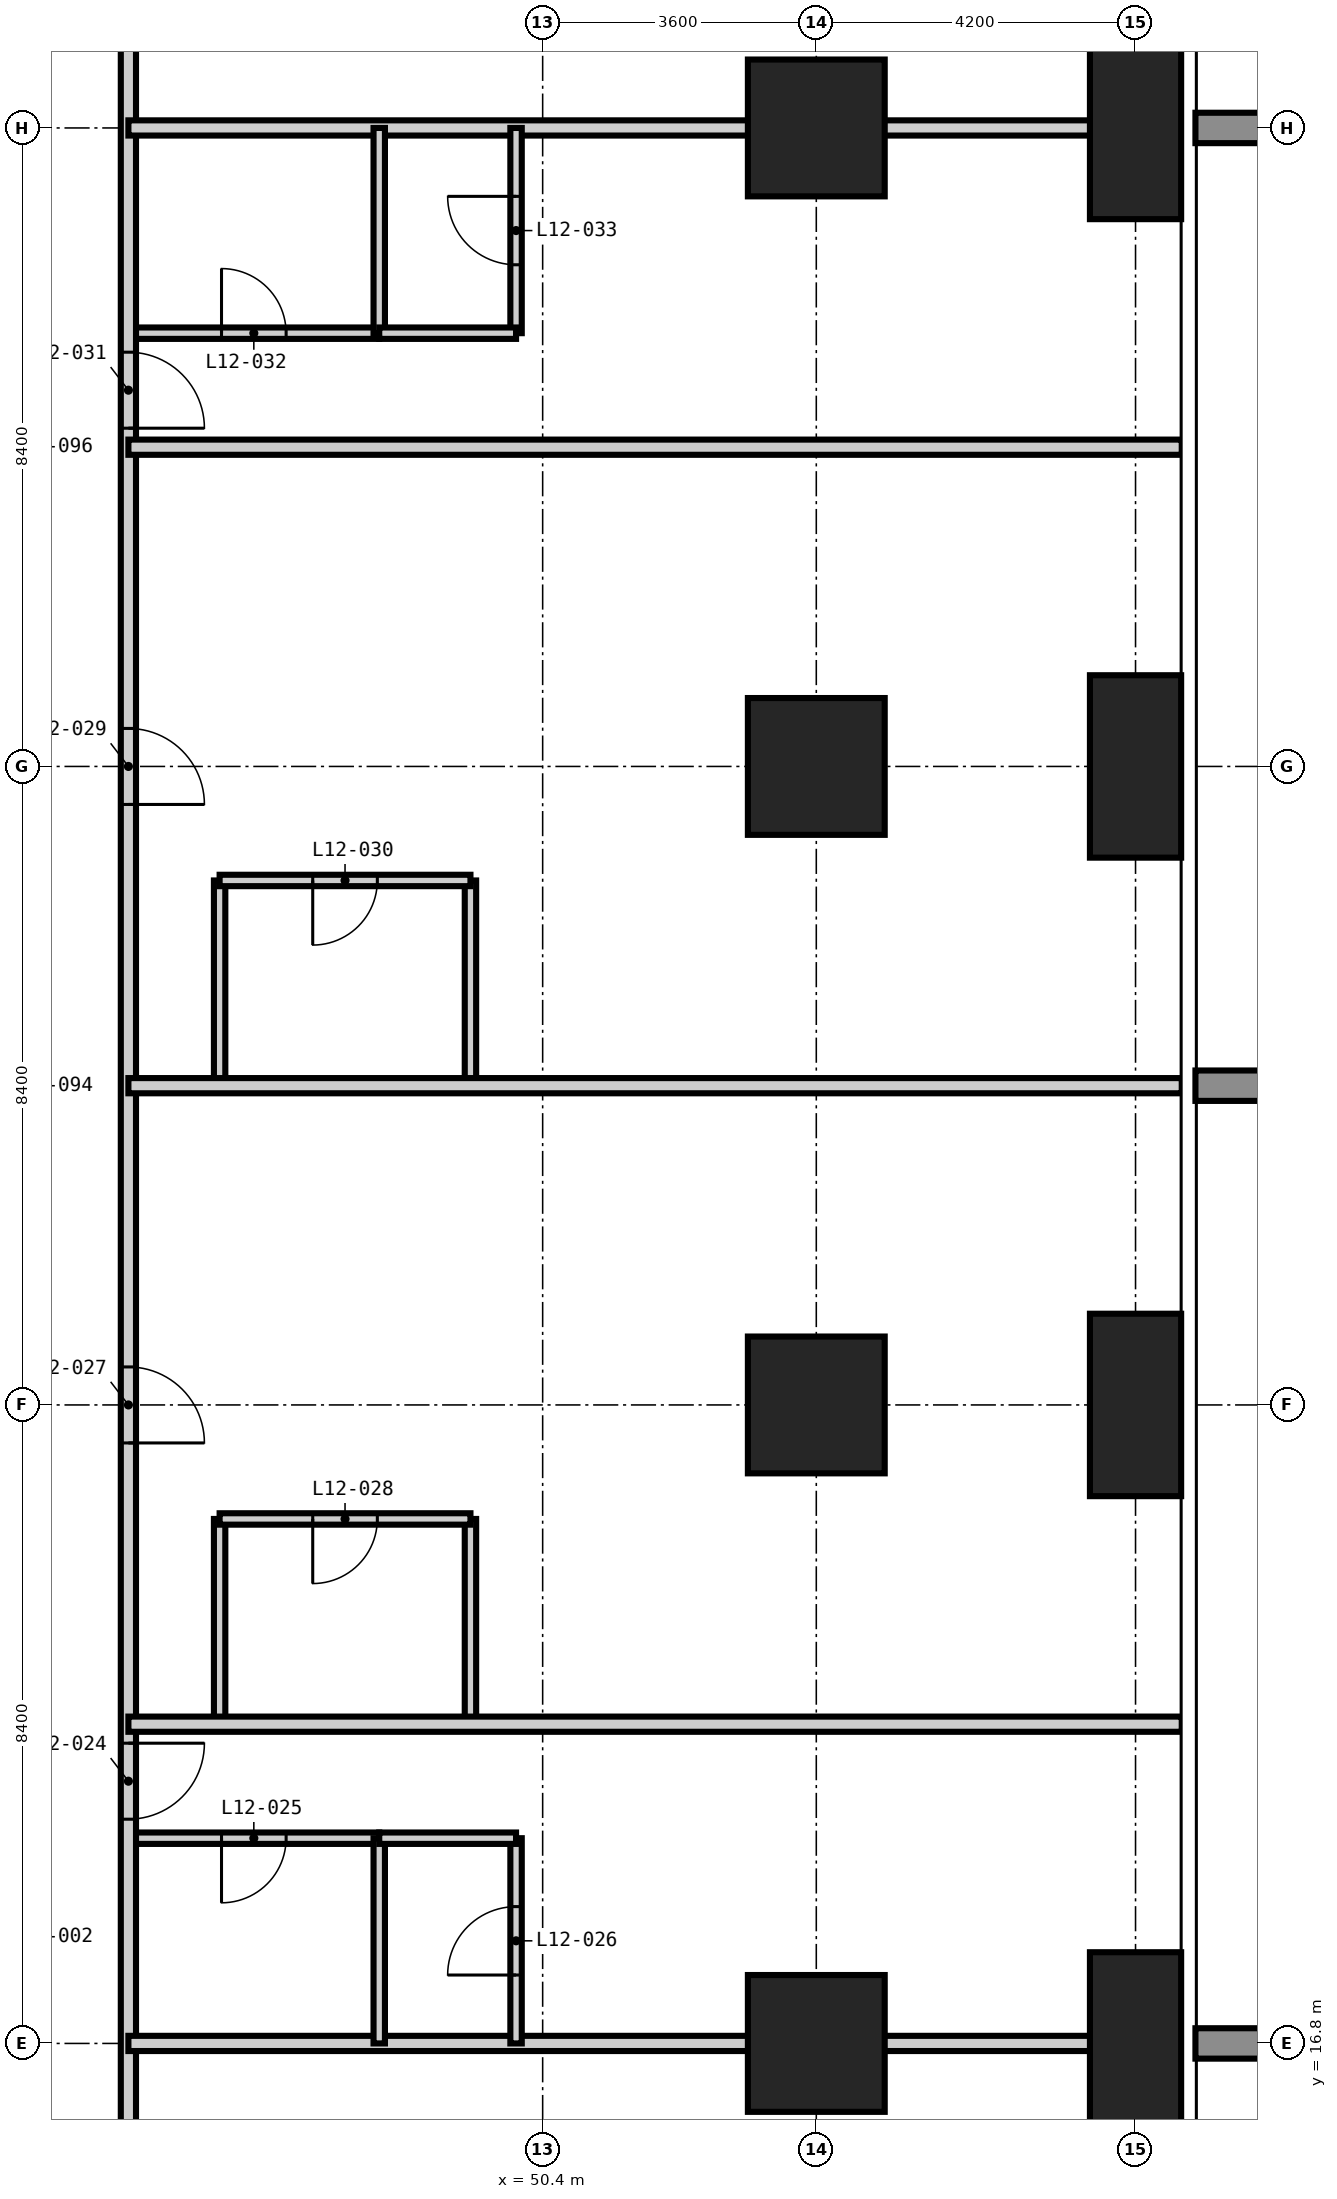
"""IFC4 building model, lengths in metres.
Left out: names, types, materials, properties, quantities, classifications, styles, units other than length and angle.
Written with IfcOpenShell. Run it as: python <this file> out.ifc"""

import sys

from ifc_helpers import new_model, si_unit, direction, frame, frame_2d, origin, origin_2d, place, context, subcontext, project, spatial, rectangle, extrude, element, fill, save


model = new_model("IFC4")
c1 = context("Model", 3, precision=1e-05, world=origin(), true_north=direction((0.0, 1.0)))
c2 = subcontext(c1, "Body", "Model", "MODEL_VIEW")
j1 = project(units=[si_unit("LENGTHUNIT", "METRE"), si_unit("PLANEANGLEUNIT", "RADIAN")], contexts=[c1])
p1 = place(None, origin())
s1 = spatial("IfcSite", under=j1, at=p1, CompositionType="ELEMENT")
p2 = place(p1, origin())
s2 = spatial("IfcBuilding", under=s1, at=p2, CompositionType="ELEMENT")
p3 = place(p2, frame((0.0, 0.0, 52.2)))
s3 = spatial("IfcBuildingStorey", under=s2, at=p3, CompositionType="ELEMENT", Elevation=52.2)
for number, where, z_axis, x_axis in (
    (1, (54.0, 16.8, -0.35), (0.0, 0.0, 1.0), (1.0, 0.0, 0.0)),
    (2, (54.0, 25.2, -0.35), (0.0, 0.0, 1.0), (1.0, 0.0, 0.0)),
    (3, (54.0, 33.6, -0.35), (0.0, 0.0, 1.0), (1.0, 0.0, 0.0)),
    (4, (54.0, 42.0, -0.35), (0.0, 0.0, 1.0), (1.0, 0.0, 0.0)),
):
    element("IfcColumn", number, at=place(p3, frame(where, z_axis=z_axis, x_axis=x_axis)), inside=s3, PredefinedType="COLUMN", context=c2, shape_type="SweptSolid", body=[
        extrude(rectangle(XDim=1.8, YDim=1.8, at=origin_2d()), origin(), (0.0, 0.0, 1.0), 3.6),
    ])
for number, where, z_axis, x_axis in (
    (5, (58.2, 16.8, -0.35), (0.0, 0.0, 1.0), (1.0, 0.0, 0.0)),
    (6, (58.2, 25.2, -0.35), (0.0, 0.0, 1.0), (1.0, 0.0, 0.0)),
    (7, (58.2, 33.6, -0.35), (0.0, 0.0, 1.0), (1.0, 0.0, 0.0)),
    (8, (58.2, 42.0, -0.35), (0.0, 0.0, 1.0), (1.0, 0.0, 0.0)),
):
    element("IfcColumn", number, at=place(p3, frame(where, z_axis=z_axis, x_axis=x_axis)), inside=s3, PredefinedType="COLUMN", context=c2, shape_type="SweptSolid", body=[
        extrude(rectangle(XDim=1.2, YDim=2.4, at=origin_2d()), origin(), (0.0, 0.0, 1.0), 3.6),
    ])
p4 = place(p3, frame((46.15, 21.0, 0.0), z_axis=(0.0, 0.0, 1.0), x_axis=(0.0, 1.0, 0.0)))
e9 = element("IfcWall", 9, at=p4, inside=s3, PredefinedType="PARTITIONING", context=c2, shape_type="SweptSolid", body=[
    extrude(rectangle(XDim=2.7, YDim=0.15, at=frame_2d((1.35, 0.0))), origin(), (0.0, 0.0, 1.0), 3.25),
])
p5 = place(p3, frame((46.15, 29.4, 0.0), z_axis=(0.0, 0.0, 1.0), x_axis=(0.0, 1.0, 0.0)))
e10 = element("IfcWall", 10, at=p5, inside=s3, PredefinedType="PARTITIONING", context=c2, shape_type="SweptSolid", body=[
    extrude(rectangle(XDim=2.7, YDim=0.15, at=frame_2d((1.35, 0.0))), origin(), (0.0, 0.0, 1.0), 3.25),
])
p6 = place(p3, frame((49.45, 21.0, 0.0), z_axis=(0.0, 0.0, 1.0), x_axis=(0.0, 1.0, 0.0)))
e11 = element("IfcWall", 11, at=p6, inside=s3, PredefinedType="PARTITIONING", context=c2, shape_type="SweptSolid", body=[
    extrude(rectangle(XDim=2.7, YDim=0.15, at=frame_2d((1.35, 0.0))), origin(), (0.0, 0.0, 1.0), 3.25),
])
p7 = place(p3, frame((49.45, 29.4, 0.0), z_axis=(0.0, 0.0, 1.0), x_axis=(0.0, 1.0, 0.0)))
e12 = element("IfcWall", 12, at=p7, inside=s3, PredefinedType="PARTITIONING", context=c2, shape_type="SweptSolid", body=[
    extrude(rectangle(XDim=2.7, YDim=0.15, at=frame_2d((1.35, 0.0))), origin(), (0.0, 0.0, 1.0), 3.25),
])
p8 = place(p3, frame((44.95, 19.5, 0.0), z_axis=(0.0, 0.0, 1.0), x_axis=(1.0, 0.0, 0.0)))
e13 = element("IfcWall", 13, at=p8, inside=s3, PredefinedType="PARTITIONING", context=c2, shape_type="SweptSolid", body=[
    extrude(rectangle(XDim=3.3, YDim=0.15, at=frame_2d((1.65, 0.0))), origin(), (0.0, 0.0, 1.0), 3.25),
])
p9 = place(p8, frame((1.225, 0.0, 0.0)))
e14 = element("IfcOpeningElement", 14, at=p9, cuts=e13, PredefinedType="OPENING", context=c2, shape_type="SweptSolid", body=[
    extrude(rectangle(XDim=0.85, YDim=2.1, at=frame_2d((0.425, 1.05))), frame((0.0, 0.085, 0.0), z_axis=(0.0, -1.0, 0.0), x_axis=(1.0, 0.0, 0.0)), (0.0, 0.0, 1.0), 0.17),
])
p10 = place(p3, frame((46.15, 23.7, 0.0), z_axis=(0.0, 0.0, 1.0), x_axis=(1.0, 0.0, 0.0)))
e15 = element("IfcWall", 15, at=p10, inside=s3, PredefinedType="PARTITIONING", context=c2, shape_type="SweptSolid", body=[
    extrude(rectangle(XDim=3.3, YDim=0.15, at=frame_2d((1.65, 0.0))), origin(), (0.0, 0.0, 1.0), 3.25),
])
p11 = place(p10, frame((1.225, 0.0, 0.0)))
e16 = element("IfcOpeningElement", 16, at=p11, cuts=e15, PredefinedType="OPENING", context=c2, shape_type="SweptSolid", body=[
    extrude(rectangle(XDim=0.85, YDim=2.1, at=frame_2d((0.425, 1.05))), frame((0.0, 0.085, 0.0), z_axis=(0.0, -1.0, 0.0), x_axis=(1.0, 0.0, 0.0)), (0.0, 0.0, 1.0), 0.17),
])
p12 = place(p3, frame((46.15, 32.1, 0.0), z_axis=(0.0, 0.0, 1.0), x_axis=(1.0, 0.0, 0.0)))
e17 = element("IfcWall", 17, at=p12, inside=s3, PredefinedType="PARTITIONING", context=c2, shape_type="SweptSolid", body=[
    extrude(rectangle(XDim=3.3, YDim=0.15, at=frame_2d((1.65, 0.0))), origin(), (0.0, 0.0, 1.0), 3.25),
])
p13 = place(p12, frame((1.225, 0.0, 0.0)))
e18 = element("IfcOpeningElement", 18, at=p13, cuts=e17, PredefinedType="OPENING", context=c2, shape_type="SweptSolid", body=[
    extrude(rectangle(XDim=0.85, YDim=2.1, at=frame_2d((0.425, 1.05))), frame((0.0, 0.085, 0.0), z_axis=(0.0, -1.0, 0.0), x_axis=(1.0, 0.0, 0.0)), (0.0, 0.0, 1.0), 0.17),
])
p14 = place(p3, frame((44.95, 39.3, 0.0), z_axis=(0.0, 0.0, 1.0), x_axis=(1.0, 0.0, 0.0)))
e19 = element("IfcWall", 19, at=p14, inside=s3, PredefinedType="PARTITIONING", context=c2, shape_type="SweptSolid", body=[
    extrude(rectangle(XDim=3.3, YDim=0.15, at=frame_2d((1.65, 0.0))), origin(), (0.0, 0.0, 1.0), 3.25),
])
p15 = place(p14, frame((1.225, 0.0, 0.0)))
e20 = element("IfcOpeningElement", 20, at=p15, cuts=e19, PredefinedType="OPENING", context=c2, shape_type="SweptSolid", body=[
    extrude(rectangle(XDim=0.85, YDim=2.1, at=frame_2d((0.425, 1.05))), frame((0.0, 0.085, 0.0), z_axis=(0.0, -1.0, 0.0), x_axis=(1.0, 0.0, 0.0)), (0.0, 0.0, 1.0), 0.17),
])
p16 = place(p3, frame((44.95, 45.55, 0.0), z_axis=(0.0, 0.0, 1.0), x_axis=(0.0, -1.0, 0.0)))
e21 = element("IfcWall", 21, at=p16, inside=s3, PredefinedType="PARTITIONING", context=c2, shape_type="SweptSolid", body=[
    extrude(rectangle(XDim=32.9, YDim=0.2, at=frame_2d((16.45, 0.0))), origin(), (0.0, 0.0, 1.0), 3.25),
])
p17 = place(p16, frame((24.8, 0.0, 0.0)))
e22 = element("IfcOpeningElement", 22, at=p17, cuts=e21, PredefinedType="OPENING", context=c2, shape_type="SweptSolid", body=[
    extrude(rectangle(XDim=1.0, YDim=2.2, at=frame_2d((0.5, 1.1))), frame((0.0, 0.11, 0.0), z_axis=(0.0, -1.0, 0.0), x_axis=(1.0, 0.0, 0.0)), (0.0, 0.0, 1.0), 0.22),
])
p18 = place(p16, frame((19.85, 0.0, 0.0)))
e23 = element("IfcOpeningElement", 23, at=p18, cuts=e21, PredefinedType="OPENING", context=c2, shape_type="SweptSolid", body=[
    extrude(rectangle(XDim=1.0, YDim=2.2, at=frame_2d((0.5, 1.1))), frame((0.0, 0.11, 0.0), z_axis=(0.0, -1.0, 0.0), x_axis=(1.0, 0.0, 0.0)), (0.0, 0.0, 1.0), 0.22),
])
p19 = place(p16, frame((11.45, 0.0, 0.0)))
e24 = element("IfcOpeningElement", 24, at=p19, cuts=e21, PredefinedType="OPENING", context=c2, shape_type="SweptSolid", body=[
    extrude(rectangle(XDim=1.0, YDim=2.2, at=frame_2d((0.5, 1.1))), frame((0.0, 0.11, 0.0), z_axis=(0.0, -1.0, 0.0), x_axis=(1.0, 0.0, 0.0)), (0.0, 0.0, 1.0), 0.22),
])
p20 = place(p16, frame((6.5, 0.0, 0.0)))
e25 = element("IfcOpeningElement", 25, at=p20, cuts=e21, PredefinedType="OPENING", context=c2, shape_type="SweptSolid", body=[
    extrude(rectangle(XDim=1.0, YDim=2.2, at=frame_2d((0.5, 1.1))), frame((0.0, 0.11, 0.0), z_axis=(0.0, -1.0, 0.0), x_axis=(1.0, 0.0, 0.0)), (0.0, 0.0, 1.0), 0.22),
])
p21 = place(p16, frame((30.325, 0.0, 0.0)))
e26 = element("IfcOpeningElement", 26, at=p21, cuts=e21, PredefinedType="OPENING", context=c2, shape_type="SweptSolid", body=[
    extrude(rectangle(XDim=1.0, YDim=2.2, at=frame_2d((0.5, 1.1))), frame((0.0, 0.11, 0.0), z_axis=(0.0, -1.0, 0.0), x_axis=(1.0, 0.0, 0.0)), (0.0, 0.0, 1.0), 0.22),
])
p22 = place(p16, frame((1.275, 0.0, 0.0)))
e27 = element("IfcOpeningElement", 27, at=p22, cuts=e21, PredefinedType="OPENING", context=c2, shape_type="SweptSolid", body=[
    extrude(rectangle(XDim=1.0, YDim=2.2, at=frame_2d((0.5, 1.1))), frame((0.0, 0.11, 0.0), z_axis=(0.0, -1.0, 0.0), x_axis=(1.0, 0.0, 0.0)), (0.0, 0.0, 1.0), 0.22),
])
for number, where, z_axis, x_axis in (
    (28, (44.95, 16.8, 0.0), (0.0, 0.0, 1.0), (1.0, 0.0, 0.0)),
    (29, (44.95, 21.0, 0.0), (0.0, 0.0, 1.0), (1.0, 0.0, 0.0)),
    (30, (44.95, 29.4, 0.0), (0.0, 0.0, 1.0), (1.0, 0.0, 0.0)),
    (31, (44.95, 37.8, 0.0), (0.0, 0.0, 1.0), (1.0, 0.0, 0.0)),
    (32, (44.95, 42.0, 0.0), (0.0, 0.0, 1.0), (1.0, 0.0, 0.0)),
):
    element("IfcWall", number, at=place(p3, frame(where, z_axis=z_axis, x_axis=x_axis)), inside=s3, PredefinedType="PARTITIONING", context=c2, shape_type="SweptSolid", body=[
        extrude(rectangle(XDim=13.858, YDim=0.2, at=frame_2d((6.929, 0.0))), origin(), (0.0, 0.0, 1.0), 3.25),
    ])
for number, where, z_axis, x_axis in (
    (33, (48.25, 16.8, 0.0), (0.0, 0.0, 1.0), (0.0, 1.0, 0.0)),
    (34, (48.25, 39.3, 0.0), (0.0, 0.0, 1.0), (0.0, 1.0, 0.0)),
):
    element("IfcWall", number, at=place(p3, frame(where, z_axis=z_axis, x_axis=x_axis)), inside=s3, PredefinedType="PARTITIONING", context=c2, shape_type="SweptSolid", body=[
        extrude(rectangle(XDim=2.7, YDim=0.15, at=frame_2d((1.35, 0.0))), origin(), (0.0, 0.0, 1.0), 3.25),
    ])
p23 = place(p3, frame((50.05, 16.8, 0.0), z_axis=(0.0, 0.0, 1.0), x_axis=(0.0, 1.0, 0.0)))
e35 = element("IfcWall", 35, at=p23, inside=s3, PredefinedType="PARTITIONING", context=c2, shape_type="SweptSolid", body=[
    extrude(rectangle(XDim=2.7, YDim=0.15, at=frame_2d((1.35, 0.0))), origin(), (0.0, 0.0, 1.0), 3.25),
])
p24 = place(p23, frame((0.9, 0.0, 0.0)))
e36 = element("IfcOpeningElement", 36, at=p24, cuts=e35, PredefinedType="OPENING", context=c2, shape_type="SweptSolid", body=[
    extrude(rectangle(XDim=0.9, YDim=2.1, at=frame_2d((0.45, 1.05))), frame((0.0, 0.085, 0.0), z_axis=(0.0, -1.0, 0.0), x_axis=(1.0, 0.0, 0.0)), (0.0, 0.0, 1.0), 0.17),
])
p25 = place(p3, frame((50.05, 39.3, 0.0), z_axis=(0.0, 0.0, 1.0), x_axis=(0.0, 1.0, 0.0)))
e37 = element("IfcWall", 37, at=p25, inside=s3, PredefinedType="PARTITIONING", context=c2, shape_type="SweptSolid", body=[
    extrude(rectangle(XDim=2.7, YDim=0.15, at=frame_2d((1.35, 0.0))), origin(), (0.0, 0.0, 1.0), 3.25),
])
p26 = place(p25, frame((0.9, 0.0, 0.0)))
e38 = element("IfcOpeningElement", 38, at=p26, cuts=e37, PredefinedType="OPENING", context=c2, shape_type="SweptSolid", body=[
    extrude(rectangle(XDim=0.9, YDim=2.1, at=frame_2d((0.45, 1.05))), frame((0.0, 0.085, 0.0), z_axis=(0.0, -1.0, 0.0), x_axis=(1.0, 0.0, 0.0)), (0.0, 0.0, 1.0), 0.17),
])
for number, where, z_axis, x_axis in (
    (39, (48.25, 19.5, 0.0), (0.0, 0.0, 1.0), (1.0, 0.0, 0.0)),
    (40, (48.25, 39.3, 0.0), (0.0, 0.0, 1.0), (1.0, 0.0, 0.0)),
):
    element("IfcWall", number, at=place(p3, frame(where, z_axis=z_axis, x_axis=x_axis)), inside=s3, PredefinedType="PARTITIONING", context=c2, shape_type="SweptSolid", body=[
        extrude(rectangle(XDim=1.8, YDim=0.15, at=frame_2d((0.9, 0.0))), origin(), (0.0, 0.0, 1.0), 3.25),
    ])
p27 = place(p17, origin())
e41 = element("IfcDoor", 41, at=p27, inside=s3, OperationType="SINGLE_SWING_LEFT", PredefinedType="DOOR", context=c2, shape_type="SweptSolid", body=[
    extrude(rectangle(XDim=1.0, YDim=2.2, at=frame_2d((0.5, 1.1))), frame((0.0, 0.025, 0.0), z_axis=(0.0, -1.0, 0.0), x_axis=(1.0, 0.0, 0.0)), (0.0, 0.0, 1.0), 0.05),
])
fill(e22, e41)
p28 = place(p9, frame((0.85, 0.0, 0.0), z_axis=(0.0, 0.0, 1.0), x_axis=(-1.0, 0.0, 0.0)))
e42 = element("IfcDoor", 42, at=p28, inside=s3, OperationType="SINGLE_SWING_RIGHT", PredefinedType="DOOR", context=c2, shape_type="SweptSolid", body=[
    extrude(rectangle(XDim=0.85, YDim=2.1, at=frame_2d((0.425, 1.05))), frame((0.0, 0.025, 0.0), z_axis=(0.0, -1.0, 0.0), x_axis=(1.0, 0.0, 0.0)), (0.0, 0.0, 1.0), 0.05),
])
fill(e14, e42)
p29 = place(p24, origin())
e43 = element("IfcDoor", 43, at=p29, inside=s3, OperationType="SINGLE_SWING_LEFT", PredefinedType="DOOR", context=c2, shape_type="SweptSolid", body=[
    extrude(rectangle(XDim=0.9, YDim=2.1, at=frame_2d((0.45, 1.05))), frame((0.0, 0.025, 0.0), z_axis=(0.0, -1.0, 0.0), x_axis=(1.0, 0.0, 0.0)), (0.0, 0.0, 1.0), 0.05),
])
fill(e36, e43)
p30 = place(p18, origin())
e44 = element("IfcDoor", 44, at=p30, inside=s3, OperationType="SINGLE_SWING_RIGHT", PredefinedType="DOOR", context=c2, shape_type="SweptSolid", body=[
    extrude(rectangle(XDim=1.0, YDim=2.2, at=frame_2d((0.5, 1.1))), frame((0.0, 0.025, 0.0), z_axis=(0.0, -1.0, 0.0), x_axis=(1.0, 0.0, 0.0)), (0.0, 0.0, 1.0), 0.05),
])
fill(e23, e44)
p31 = place(p11, frame((0.85, 0.0, 0.0), z_axis=(0.0, 0.0, 1.0), x_axis=(-1.0, 0.0, 0.0)))
e45 = element("IfcDoor", 45, at=p31, inside=s3, OperationType="SINGLE_SWING_RIGHT", PredefinedType="DOOR", context=c2, shape_type="SweptSolid", body=[
    extrude(rectangle(XDim=0.85, YDim=2.1, at=frame_2d((0.425, 1.05))), frame((0.0, 0.025, 0.0), z_axis=(0.0, -1.0, 0.0), x_axis=(1.0, 0.0, 0.0)), (0.0, 0.0, 1.0), 0.05),
])
fill(e16, e45)
p32 = place(p19, origin())
e46 = element("IfcDoor", 46, at=p32, inside=s3, OperationType="SINGLE_SWING_RIGHT", PredefinedType="DOOR", context=c2, shape_type="SweptSolid", body=[
    extrude(rectangle(XDim=1.0, YDim=2.2, at=frame_2d((0.5, 1.1))), frame((0.0, 0.025, 0.0), z_axis=(0.0, -1.0, 0.0), x_axis=(1.0, 0.0, 0.0)), (0.0, 0.0, 1.0), 0.05),
])
fill(e24, e46)
p33 = place(p13, frame((0.85, 0.0, 0.0), z_axis=(0.0, 0.0, 1.0), x_axis=(-1.0, 0.0, 0.0)))
e47 = element("IfcDoor", 47, at=p33, inside=s3, OperationType="SINGLE_SWING_RIGHT", PredefinedType="DOOR", context=c2, shape_type="SweptSolid", body=[
    extrude(rectangle(XDim=0.85, YDim=2.1, at=frame_2d((0.425, 1.05))), frame((0.0, 0.025, 0.0), z_axis=(0.0, -1.0, 0.0), x_axis=(1.0, 0.0, 0.0)), (0.0, 0.0, 1.0), 0.05),
])
fill(e18, e47)
p34 = place(p20, origin())
e48 = element("IfcDoor", 48, at=p34, inside=s3, OperationType="SINGLE_SWING_RIGHT", PredefinedType="DOOR", context=c2, shape_type="SweptSolid", body=[
    extrude(rectangle(XDim=1.0, YDim=2.2, at=frame_2d((0.5, 1.1))), frame((0.0, 0.025, 0.0), z_axis=(0.0, -1.0, 0.0), x_axis=(1.0, 0.0, 0.0)), (0.0, 0.0, 1.0), 0.05),
])
fill(e25, e48)
p35 = place(p15, origin())
e49 = element("IfcDoor", 49, at=p35, inside=s3, OperationType="SINGLE_SWING_LEFT", PredefinedType="DOOR", context=c2, shape_type="SweptSolid", body=[
    extrude(rectangle(XDim=0.85, YDim=2.1, at=frame_2d((0.425, 1.05))), frame((0.0, 0.025, 0.0), z_axis=(0.0, -1.0, 0.0), x_axis=(1.0, 0.0, 0.0)), (0.0, 0.0, 1.0), 0.05),
])
fill(e20, e49)
p36 = place(p26, origin())
e50 = element("IfcDoor", 50, at=p36, inside=s3, OperationType="SINGLE_SWING_RIGHT", PredefinedType="DOOR", context=c2, shape_type="SweptSolid", body=[
    extrude(rectangle(XDim=0.9, YDim=2.1, at=frame_2d((0.45, 1.05))), frame((0.0, 0.025, 0.0), z_axis=(0.0, -1.0, 0.0), x_axis=(1.0, 0.0, 0.0)), (0.0, 0.0, 1.0), 0.05),
])
fill(e38, e50)
save(model, sys.argv[1])
